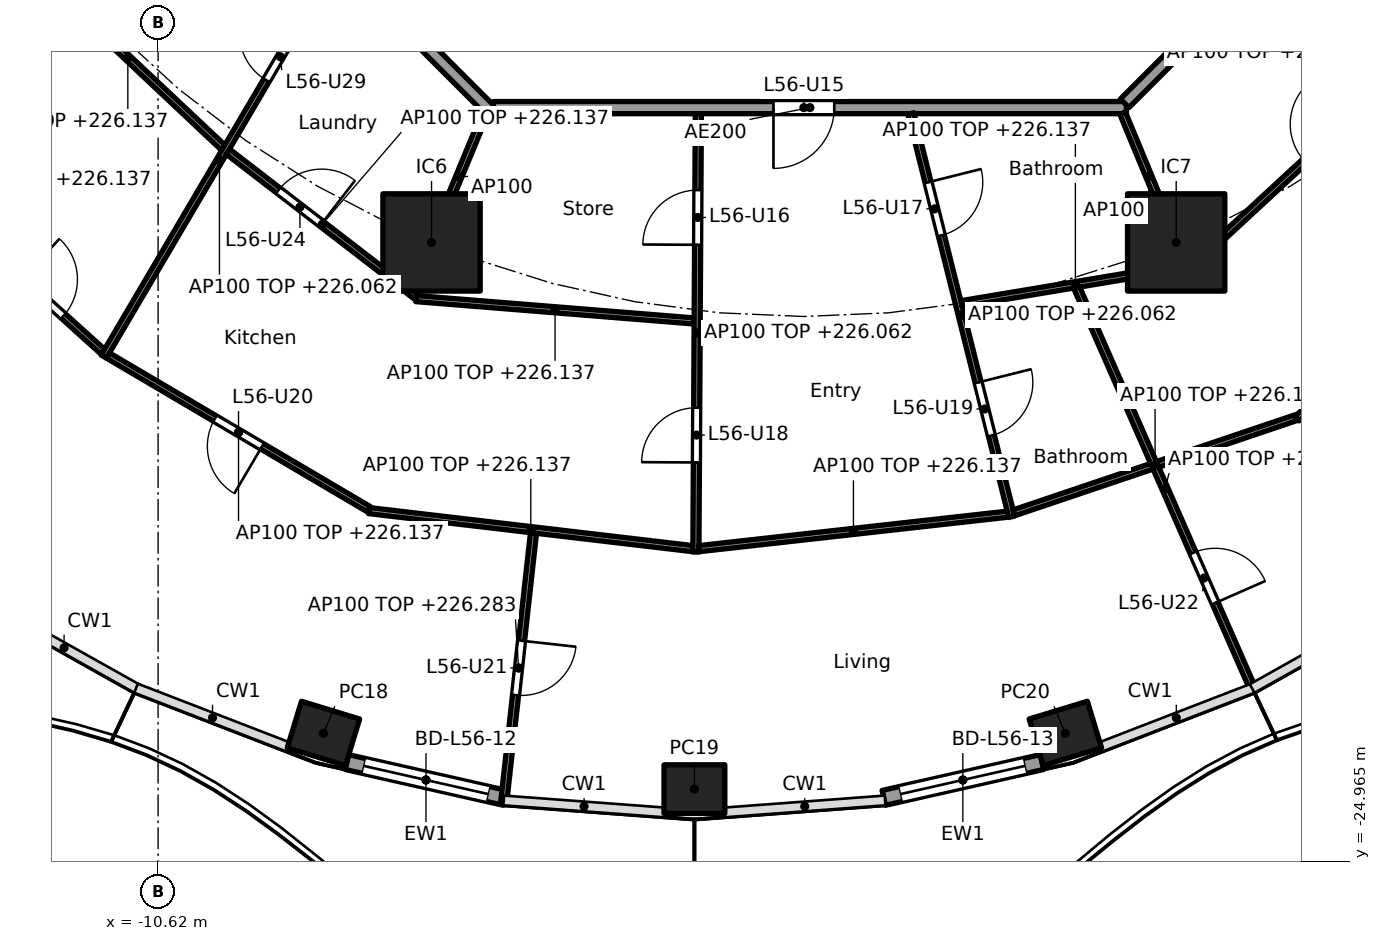
"""IFC4 building model, lengths in metres.
Left out: names, types, materials, properties, quantities, classifications, styles, units other than length and angle.
Written with IfcOpenShell. Run it as: python <this file> out.ifc"""

import sys

from ifc_helpers import new_model, si_unit, direction, frame, frame_2d, origin, origin_2d, place, context, subcontext, project, spatial, rectangle, hollow_rectangle, extrude, element, fill, save


model = new_model("IFC4")
c1 = context("Model", 3, precision=1e-05, world=origin(), true_north=direction((0.0, 1.0)))
c2 = subcontext(c1, "Body", "Model", "MODEL_VIEW")
j1 = project(units=[si_unit("LENGTHUNIT", "METRE"), si_unit("PLANEANGLEUNIT", "RADIAN")], contexts=[c1])
p1 = place(None, origin())
s1 = spatial("IfcSite", under=j1, at=p1, CompositionType="ELEMENT")
p2 = place(p1, origin())
s2 = spatial("IfcBuilding", under=s1, at=p2, CompositionType="ELEMENT")
p3 = place(p2, frame((0.0, 0.0, 223.3)))
s3 = spatial("IfcBuildingStorey", under=s2, at=p3, CompositionType="ELEMENT", Elevation=223.3)
for number, where, z_axis, x_axis in (
    (1, (-7.9, -22.856, 0.0), (0.0, 0.0, 1.0), (0.957, -0.292, 0.0)),
    (2, (-1.8, -23.772, 0.0), (0.0, 0.0, 1.0), (1.0, 0.0, 0.0)),
    (3, (4.3, -22.856, 0.0), (0.0, 0.0, 1.0), (0.957, 0.292, 0.0)),
):
    element("IfcColumn", number, at=place(p3, frame(where, z_axis=z_axis, x_axis=x_axis)), inside=s3, PredefinedType="COLUMN", context=c2, shape_type="SweptSolid", body=[
        extrude(hollow_rectangle(XDim=1.0, YDim=0.8, WallThickness=0.032, at=origin_2d()), origin(), (0.0, 0.0, 1.0), 3.7),
    ])
for number, where, z_axis, x_axis in (
    (4, (-6.123, -14.782, 0.0), (0.0, 0.0, 1.0), (1.0, 0.0, 0.0)),
    (5, (6.123, -14.782, 0.0), (0.0, 0.0, 1.0), (1.0, 0.0, 0.0)),
):
    element("IfcColumn", number, at=place(p3, frame(where, z_axis=z_axis, x_axis=x_axis)), inside=s3, PredefinedType="COLUMN", context=c2, shape_type="SweptSolid", body=[
        extrude(rectangle(XDim=1.6, YDim=1.6, at=origin_2d()), origin(), (0.0, 0.0, 1.0), 3.7),
    ])
p4 = place(p3, frame((-4.914, -23.916, 0.0), z_axis=(0.0, 0.0, 1.0), x_axis=(-0.975324089124, 0.220777990694, 0.0)))
e6 = element("IfcWall", 6, at=p4, inside=s3, PredefinedType="SOLIDWALL", context=c2, shape_type="SweptSolid", body=[
    extrude(rectangle(XDim=2.666, YDim=0.25, at=frame_2d((1.333, 0.0))), origin(), (0.0, 0.0, 1.0), 3.44),
])
p5 = place(p4, frame((0.283, 0.0, 0.0)))
e7 = element("IfcOpeningElement", 7, at=p5, cuts=e6, PredefinedType="OPENING", context=c2, shape_type="SweptSolid", body=[
    extrude(rectangle(XDim=2.1, YDim=2.4, at=frame_2d((1.05, 1.2))), frame((0.0, 0.135, 0.0), z_axis=(0.0, -1.0, 0.0), x_axis=(1.0, 0.0, 0.0)), (0.0, 0.0, 1.0), 0.27),
])
p6 = place(p3, frame((3.915, -23.327, 0.0), z_axis=(0.0, 0.0, 1.0), x_axis=(-0.975324089124, -0.220777990694, 0.0)))
e8 = element("IfcWall", 8, at=p6, inside=s3, PredefinedType="SOLIDWALL", context=c2, shape_type="SweptSolid", body=[
    extrude(rectangle(XDim=2.666, YDim=0.25, at=frame_2d((1.333, 0.0))), origin(), (0.0, 0.0, 1.0), 3.44),
])
p7 = place(p6, frame((0.283, 0.0, 0.0)))
e9 = element("IfcOpeningElement", 9, at=p7, cuts=e8, PredefinedType="OPENING", context=c2, shape_type="SweptSolid", body=[
    extrude(rectangle(XDim=2.1, YDim=2.4, at=frame_2d((1.05, 1.2))), frame((0.0, 0.135, 0.0), z_axis=(0.0, -1.0, 0.0), x_axis=(1.0, 0.0, 0.0)), (0.0, 0.0, 1.0), 0.27),
])
p8 = place(p3, frame((-12.635, -5.134, 0.0), z_axis=(0.0, 0.0, 1.0), x_axis=(0.707106781187, -0.707106781187, 0.0)))
e10 = element("IfcWall", 10, at=p8, inside=s3, PredefinedType="PARTITIONING", context=c2, shape_type="SweptSolid", body=[
    extrude(rectangle(XDim=10.609, YDim=0.2, at=frame_2d((5.305, 0.0))), origin(), (0.0, 0.0, 1.0), 3.44),
])
p9 = place(p3, frame((-5.104, -12.565, 0.0), z_axis=(0.0, 0.0, 1.0), x_axis=(1.0, 0.0, 0.0)))
e11 = element("IfcWall", 11, at=p9, inside=s3, PredefinedType="PARTITIONING", context=c2, shape_type="SweptSolid", body=[
    extrude(rectangle(XDim=10.409, YDim=0.2, at=frame_2d((5.205, 0.0))), origin(), (0.0, 0.0, 1.0), 3.44),
])
p10 = place(p9, frame((4.604, 0.0, 0.0)))
e12 = element("IfcOpeningElement", 12, at=p10, cuts=e11, PredefinedType="OPENING", context=c2, shape_type="SweptSolid", body=[
    extrude(rectangle(XDim=1.0, YDim=2.1, at=frame_2d((0.5, 1.05))), frame((0.0, 0.11, 0.0), z_axis=(0.0, -1.0, 0.0), x_axis=(1.0, 0.0, 0.0)), (0.0, 0.0, 1.0), 0.22),
])
p11 = place(p3, frame((5.275, -12.494, 0.0), z_axis=(0.0, 0.0, 1.0), x_axis=(0.707106781187, 0.707106781187, 0.0)))
e13 = element("IfcWall", 13, at=p11, inside=s3, PredefinedType="PARTITIONING", context=c2, shape_type="SweptSolid", body=[
    extrude(rectangle(XDim=10.409, YDim=0.2, at=frame_2d((5.205, 0.0))), origin(), (0.0, 0.0, 1.0), 3.44),
])
p12 = place(p3, frame((-12.688, -10.27, 0.0), z_axis=(0.0, 0.0, 1.0), x_axis=(0.728268142903, -0.685292282192, 0.0)))
e14 = element("IfcWall", 14, at=p12, inside=s3, PredefinedType="PARTITIONING", context=c2, shape_type="SweptSolid", body=[
    extrude(rectangle(XDim=4.312, YDim=0.1, at=frame_2d((2.156, 0.0))), origin(), (0.0, 0.0, 1.0), 2.837),
])
p13 = place(p3, frame((-15.474, -13.019, 0.0), z_axis=(0.0, 0.0, 1.0), x_axis=(0.742348572616, -0.670013878017, 0.0)))
e15 = element("IfcWall", 15, at=p13, inside=s3, PredefinedType="PARTITIONING", context=c2, shape_type="SweptSolid", body=[
    extrude(rectangle(XDim=5.319, YDim=0.1, at=frame_2d((2.66, 0.0))), origin(), (0.0, 0.0, 1.0), 2.837),
])
p14 = place(p13, frame((3.54, 0.0, 0.0)))
e16 = element("IfcOpeningElement", 16, at=p14, cuts=e15, PredefinedType="OPENING", context=c2, shape_type="SweptSolid", body=[
    extrude(rectangle(XDim=0.9, YDim=2.1, at=frame_2d((0.45, 1.05))), frame((0.0, 0.06, 0.0), z_axis=(0.0, -1.0, 0.0), x_axis=(1.0, 0.0, 0.0)), (0.0, 0.0, 1.0), 0.12),
])
p15 = place(p3, frame((-7.709, -10.198, 0.0), z_axis=(0.0, 0.0, 1.0), x_axis=(-0.507362999545, -0.861732433353, 0.0)))
e17 = element("IfcWall", 17, at=p15, inside=s3, PredefinedType="PARTITIONING", context=c2, shape_type="SweptSolid", body=[
    extrude(rectangle(XDim=7.499, YDim=0.1, at=frame_2d((3.749, 0.0))), origin(), (0.0, 0.0, 1.0), 2.762),
])
p16 = place(p15, frame((1.326, 0.0, 0.0)))
e18 = element("IfcOpeningElement", 18, at=p16, cuts=e17, PredefinedType="OPENING", context=c2, shape_type="SweptSolid", body=[
    extrude(rectangle(XDim=0.9, YDim=2.1, at=frame_2d((0.45, 1.05))), frame((0.0, 0.06, 0.0), z_axis=(0.0, -1.0, 0.0), x_axis=(1.0, 0.0, 0.0)), (0.0, 0.0, 1.0), 0.12),
])
p17 = place(p3, frame((-9.471, -13.289, 0.0), z_axis=(0.0, 0.0, 1.0), x_axis=(0.7922205419, -0.61023488346, 0.0)))
e19 = element("IfcWall", 19, at=p17, inside=s3, PredefinedType="PARTITIONING", context=c2, shape_type="SweptSolid", body=[
    extrude(rectangle(XDim=3.916, YDim=0.1, at=frame_2d((1.958, 0.0))), origin(), (0.0, 0.0, 1.0), 2.837),
])
p18 = place(p17, frame((1.045, 0.0, 0.0)))
e20 = element("IfcOpeningElement", 20, at=p18, cuts=e19, PredefinedType="OPENING", context=c2, shape_type="SweptSolid", body=[
    extrude(rectangle(XDim=0.9, YDim=2.1, at=frame_2d((0.45, 1.05))), frame((0.0, 0.06, 0.0), z_axis=(0.0, -1.0, 0.0), x_axis=(1.0, 0.0, 0.0)), (0.0, 0.0, 1.0), 0.12),
])
p19 = place(p3, frame((-11.445, -16.641, 0.0), z_axis=(0.0, 0.0, 1.0), x_axis=(0.861562560957, -0.507651409489, 0.0)))
e21 = element("IfcWall", 21, at=p19, inside=s3, PredefinedType="PARTITIONING", context=c2, shape_type="SweptSolid", body=[
    extrude(rectangle(XDim=4.985, YDim=0.1, at=frame_2d((2.492, 0.0))), origin(), (0.0, 0.0, 1.0), 2.837),
])
p20 = place(p19, frame((2.042, 0.0, 0.0)))
e22 = element("IfcOpeningElement", 22, at=p20, cuts=e21, PredefinedType="OPENING", context=c2, shape_type="SweptSolid", body=[
    extrude(rectangle(XDim=0.9, YDim=2.1, at=frame_2d((0.45, 1.05))), frame((0.0, 0.06, 0.0), z_axis=(0.0, -1.0, 0.0), x_axis=(1.0, 0.0, 0.0)), (0.0, 0.0, 1.0), 0.12),
])
p21 = place(p3, frame((-5.243, -12.657, 0.0), z_axis=(0.0, 0.0, 1.0), x_axis=(-0.382719158442, -0.923864733477, 0.0)))
e23 = element("IfcWall", 23, at=p21, inside=s3, PredefinedType="PARTITIONING", context=c2, shape_type="SweptSolid", body=[
    extrude(rectangle(XDim=2.25, YDim=0.1, at=frame_2d((1.125, 0.0))), origin(), (0.0, 0.0, 1.0), 3.44),
])
p22 = place(p3, frame((-6.379, -15.705, 0.0), z_axis=(0.0, 0.0, 1.0), x_axis=(0.996786462227, -0.080104611105, 0.0)))
e24 = element("IfcWall", 24, at=p22, inside=s3, PredefinedType="PARTITIONING", context=c2, shape_type="SweptSolid", body=[
    extrude(rectangle(XDim=4.59, YDim=0.1, at=frame_2d((2.295, 0.0))), origin(), (0.0, 0.0, 1.0), 2.837),
])
p23 = place(p3, frame((-7.156, -19.191, 0.0), z_axis=(0.0, 0.0, 1.0), x_axis=(0.993172627718, -0.116653896424, 0.0)))
e25 = element("IfcWall", 25, at=p23, inside=s3, PredefinedType="PARTITIONING", context=c2, shape_type="SweptSolid", body=[
    extrude(rectangle(XDim=5.368, YDim=0.1, at=frame_2d((2.684, 0.0))), origin(), (0.0, 0.0, 1.0), 2.837),
])
p24 = place(p3, frame((-4.447, -19.56, 0.0), z_axis=(0.0, 0.0, 1.0), x_axis=(-0.109897425445, -0.993942933915, 0.0)))
e26 = element("IfcWall", 26, at=p24, inside=s3, PredefinedType="PARTITIONING", context=c2, shape_type="SweptSolid", body=[
    extrude(rectangle(XDim=4.465, YDim=0.1, at=frame_2d((2.233, 0.0))), origin(), (0.0, 0.0, 1.0), 2.983),
])
p25 = place(p24, frame((1.783, 0.0, 0.0)))
e27 = element("IfcOpeningElement", 27, at=p25, cuts=e26, PredefinedType="OPENING", context=c2, shape_type="SweptSolid", body=[
    extrude(rectangle(XDim=0.9, YDim=2.1, at=frame_2d((0.45, 1.05))), frame((0.0, 0.06, 0.0), z_axis=(0.0, -1.0, 0.0), x_axis=(1.0, 0.0, 0.0)), (0.0, 0.0, 1.0), 0.12),
])
p26 = place(p3, frame((-1.735, -12.665, 0.0), z_axis=(0.0, 0.0, 1.0), x_axis=(-0.005554152823, -0.999984575574, 0.0)))
e28 = element("IfcWall", 28, at=p26, inside=s3, PredefinedType="PARTITIONING", context=c2, shape_type="SweptSolid", body=[
    extrude(rectangle(XDim=7.209, YDim=0.1, at=frame_2d((3.604, 0.0))), origin(), (0.0, 0.0, 1.0), 2.762),
])
p27 = place(p26, frame((1.256, 0.0, 0.0)))
e29 = element("IfcOpeningElement", 29, at=p27, cuts=e28, PredefinedType="OPENING", context=c2, shape_type="SweptSolid", body=[
    extrude(rectangle(XDim=0.9, YDim=2.1, at=frame_2d((0.45, 1.05))), frame((0.0, 0.06, 0.0), z_axis=(0.0, -1.0, 0.0), x_axis=(1.0, 0.0, 0.0)), (0.0, 0.0, 1.0), 0.12),
])
p28 = place(p26, frame((4.836, 0.0, 0.0)))
e30 = element("IfcOpeningElement", 30, at=p28, cuts=e28, PredefinedType="OPENING", context=c2, shape_type="SweptSolid", body=[
    extrude(rectangle(XDim=0.9, YDim=2.1, at=frame_2d((0.45, 1.05))), frame((0.0, 0.06, 0.0), z_axis=(0.0, -1.0, 0.0), x_axis=(1.0, 0.0, 0.0)), (0.0, 0.0, 1.0), 0.12),
])
p29 = place(p3, frame((-1.726, -19.818, 0.0), z_axis=(0.0, 0.0, 1.0), x_axis=(0.99381893047, 0.111013212902, 0.0)))
e31 = element("IfcWall", 31, at=p29, inside=s3, PredefinedType="PARTITIONING", context=c2, shape_type="SweptSolid", body=[
    extrude(rectangle(XDim=5.113, YDim=0.1, at=frame_2d((2.557, 0.0))), origin(), (0.0, 0.0, 1.0), 2.837),
])
p30 = place(p3, frame((1.759, -12.662, 0.0), z_axis=(0.0, 0.0, 1.0), x_axis=(0.242653275363, -0.970113079984, 0.0)))
e32 = element("IfcWall", 32, at=p30, inside=s3, PredefinedType="PARTITIONING", context=c2, shape_type="SweptSolid", body=[
    extrude(rectangle(XDim=6.836, YDim=0.1, at=frame_2d((3.418, 0.0))), origin(), (0.0, 0.0, 1.0), 2.762),
])
p31 = place(p30, frame((1.166, 0.0, 0.0)))
e33 = element("IfcOpeningElement", 33, at=p31, cuts=e32, PredefinedType="OPENING", context=c2, shape_type="SweptSolid", body=[
    extrude(rectangle(XDim=0.9, YDim=2.1, at=frame_2d((0.45, 1.05))), frame((0.0, 0.06, 0.0), z_axis=(0.0, -1.0, 0.0), x_axis=(1.0, 0.0, 0.0)), (0.0, 0.0, 1.0), 0.12),
])
p32 = place(p30, frame((4.559, 0.0, 0.0)))
e34 = element("IfcOpeningElement", 34, at=p32, cuts=e32, PredefinedType="OPENING", context=c2, shape_type="SweptSolid", body=[
    extrude(rectangle(XDim=0.9, YDim=2.1, at=frame_2d((0.45, 1.05))), frame((0.0, 0.06, 0.0), z_axis=(0.0, -1.0, 0.0), x_axis=(1.0, 0.0, 0.0)), (0.0, 0.0, 1.0), 0.12),
])
p33 = place(p3, frame((2.593, -15.789, 0.0), z_axis=(0.0, 0.0, 1.0), x_axis=(0.986381756816, 0.164471972749, 0.0)))
e35 = element("IfcWall", 35, at=p33, inside=s3, PredefinedType="PARTITIONING", context=c2, shape_type="SweptSolid", body=[
    extrude(rectangle(XDim=3.797, YDim=0.1, at=frame_2d((1.898, 0.0))), origin(), (0.0, 0.0, 1.0), 2.837),
])
p34 = place(p3, frame((3.453, -19.229, 0.0), z_axis=(0.0, 0.0, 1.0), x_axis=(0.947572025416, 0.319542261133, 0.0)))
e36 = element("IfcWall", 36, at=p34, inside=s3, PredefinedType="PARTITIONING", context=c2, shape_type="SweptSolid", body=[
    extrude(rectangle(XDim=4.903, YDim=0.1, at=frame_2d((2.451, 0.0))), origin(), (0.0, 0.0, 1.0), 2.837),
])
p35 = place(p3, frame((4.485, -15.522, 0.0), z_axis=(0.0, 0.0, 1.0), x_axis=(0.401959715825, -0.915657352318, 0.0)))
e37 = element("IfcWall", 37, at=p35, inside=s3, PredefinedType="PARTITIONING", context=c2, shape_type="SweptSolid", body=[
    extrude(rectangle(XDim=7.239, YDim=0.1, at=frame_2d((3.619, 0.0))), origin(), (0.0, 0.0, 1.0), 2.983),
])
p36 = place(p35, frame((4.767, 0.0, 0.0)))
e38 = element("IfcOpeningElement", 38, at=p36, cuts=e37, PredefinedType="OPENING", context=c2, shape_type="SweptSolid", body=[
    extrude(rectangle(XDim=0.9, YDim=2.1, at=frame_2d((0.45, 1.05))), frame((0.0, 0.06, 0.0), z_axis=(0.0, -1.0, 0.0), x_axis=(1.0, 0.0, 0.0)), (0.0, 0.0, 1.0), 0.12),
])
p37 = place(p3, frame((5.243, -12.657, 0.0), z_axis=(0.0, 0.0, 1.0), x_axis=(0.382719158442, -0.923864733477, 0.0)))
e39 = element("IfcWall", 39, at=p37, inside=s3, PredefinedType="PARTITIONING", context=c2, shape_type="SweptSolid", body=[
    extrude(rectangle(XDim=2.25, YDim=0.1, at=frame_2d((1.125, 0.0))), origin(), (0.0, 0.0, 1.0), 3.44),
])
p38 = place(p3, frame((6.351, -15.19, 0.0), z_axis=(0.0, 0.0, 1.0), x_axis=(0.73462674599, 0.678471476243, 0.0)))
e40 = element("IfcWall", 40, at=p38, inside=s3, PredefinedType="PARTITIONING", context=c2, shape_type="SweptSolid", body=[
    extrude(rectangle(XDim=5.987, YDim=0.1, at=frame_2d((2.993, 0.0))), origin(), (0.0, 0.0, 1.0), 2.837),
])
p39 = place(p38, frame((2.568, 0.0, 0.0)))
e41 = element("IfcOpeningElement", 41, at=p39, cuts=e40, PredefinedType="OPENING", context=c2, shape_type="SweptSolid", body=[
    extrude(rectangle(XDim=0.9, YDim=2.1, at=frame_2d((0.45, 1.05))), frame((0.0, 0.06, 0.0), z_axis=(0.0, -1.0, 0.0), x_axis=(1.0, 0.0, 0.0)), (0.0, 0.0, 1.0), 0.12),
])
p40 = place(p3, frame((8.109, -17.679, 0.0), z_axis=(0.0, 0.0, 1.0), x_axis=(0.743675165651, 0.668541134108, 0.0)))
e42 = element("IfcWall", 42, at=p40, inside=s3, PredefinedType="PARTITIONING", context=c2, shape_type="SweptSolid", body=[
    extrude(rectangle(XDim=6.275, YDim=0.1, at=frame_2d((3.137, 0.0))), origin(), (0.0, 0.0, 1.0), 2.837),
])
p41 = place(p40, frame((2.712, 0.0, 0.0)))
e43 = element("IfcOpeningElement", 43, at=p41, cuts=e42, PredefinedType="OPENING", context=c2, shape_type="SweptSolid", body=[
    extrude(rectangle(XDim=0.9, YDim=2.1, at=frame_2d((0.45, 1.05))), frame((0.0, 0.06, 0.0), z_axis=(0.0, -1.0, 0.0), x_axis=(1.0, 0.0, 0.0)), (0.0, 0.0, 1.0), 0.12),
])
p42 = place(p5, origin())
e44 = element("IfcDoor", 44, at=p42, inside=s3, OperationType="SLIDING_TO_LEFT", PredefinedType="DOOR", context=c2, shape_type="SweptSolid", body=[
    extrude(rectangle(XDim=2.1, YDim=2.4, at=frame_2d((1.05, 1.2))), frame((0.0, 0.025, 0.0), z_axis=(0.0, -1.0, 0.0), x_axis=(1.0, 0.0, 0.0)), (0.0, 0.0, 1.0), 0.05),
])
fill(e7, e44)
p43 = place(p7, origin())
e45 = element("IfcDoor", 45, at=p43, inside=s3, OperationType="SLIDING_TO_LEFT", PredefinedType="DOOR", context=c2, shape_type="SweptSolid", body=[
    extrude(rectangle(XDim=2.1, YDim=2.4, at=frame_2d((1.05, 1.2))), frame((0.0, 0.025, 0.0), z_axis=(0.0, -1.0, 0.0), x_axis=(1.0, 0.0, 0.0)), (0.0, 0.0, 1.0), 0.05),
])
fill(e9, e45)
p44 = place(p10, frame((1.0, 0.0, 0.0), x_axis=(-1.0, 0.0, 0.0)))
e46 = element("IfcDoor", 46, at=p44, inside=s3, OperationType="SINGLE_SWING_RIGHT", PredefinedType="DOOR", context=c2, shape_type="SweptSolid", body=[
    extrude(rectangle(XDim=1.0, YDim=2.1, at=frame_2d((0.5, 1.05))), frame((0.0, 0.025, 0.0), z_axis=(0.0, -1.0, 0.0), x_axis=(1.0, 0.0, 0.0)), (0.0, 0.0, 1.0), 0.05),
])
fill(e12, e46)
p45 = place(p27, frame((0.9, 0.0, 0.0), x_axis=(-1.0, 0.0, 0.0)))
e47 = element("IfcDoor", 47, at=p45, inside=s3, OperationType="SINGLE_SWING_LEFT", PredefinedType="DOOR", context=c2, shape_type="SweptSolid", body=[
    extrude(rectangle(XDim=0.9, YDim=2.1, at=frame_2d((0.45, 1.05))), frame((0.0, 0.025, 0.0), z_axis=(0.0, -1.0, 0.0), x_axis=(1.0, 0.0, 0.0)), (0.0, 0.0, 1.0), 0.05),
])
fill(e29, e47)
p46 = place(p31, origin())
e48 = element("IfcDoor", 48, at=p46, inside=s3, OperationType="SINGLE_SWING_LEFT", PredefinedType="DOOR", context=c2, shape_type="SweptSolid", body=[
    extrude(rectangle(XDim=0.9, YDim=2.1, at=frame_2d((0.45, 1.05))), frame((0.0, 0.025, 0.0), z_axis=(0.0, -1.0, 0.0), x_axis=(1.0, 0.0, 0.0)), (0.0, 0.0, 1.0), 0.05),
])
fill(e33, e48)
p47 = place(p28, frame((0.9, 0.0, 0.0), x_axis=(-1.0, 0.0, 0.0)))
e49 = element("IfcDoor", 49, at=p47, inside=s3, OperationType="SINGLE_SWING_LEFT", PredefinedType="DOOR", context=c2, shape_type="SweptSolid", body=[
    extrude(rectangle(XDim=0.9, YDim=2.1, at=frame_2d((0.45, 1.05))), frame((0.0, 0.025, 0.0), z_axis=(0.0, -1.0, 0.0), x_axis=(1.0, 0.0, 0.0)), (0.0, 0.0, 1.0), 0.05),
])
fill(e30, e49)
p48 = place(p32, origin())
e50 = element("IfcDoor", 50, at=p48, inside=s3, OperationType="SINGLE_SWING_LEFT", PredefinedType="DOOR", context=c2, shape_type="SweptSolid", body=[
    extrude(rectangle(XDim=0.9, YDim=2.1, at=frame_2d((0.45, 1.05))), frame((0.0, 0.025, 0.0), z_axis=(0.0, -1.0, 0.0), x_axis=(1.0, 0.0, 0.0)), (0.0, 0.0, 1.0), 0.05),
])
fill(e34, e50)
p49 = place(p20, frame((0.9, 0.0, 0.0), x_axis=(-1.0, 0.0, 0.0)))
e51 = element("IfcDoor", 51, at=p49, inside=s3, OperationType="SINGLE_SWING_LEFT", PredefinedType="DOOR", context=c2, shape_type="SweptSolid", body=[
    extrude(rectangle(XDim=0.9, YDim=2.1, at=frame_2d((0.45, 1.05))), frame((0.0, 0.025, 0.0), z_axis=(0.0, -1.0, 0.0), x_axis=(1.0, 0.0, 0.0)), (0.0, 0.0, 1.0), 0.05),
])
fill(e22, e51)
p50 = place(p25, origin())
e52 = element("IfcDoor", 52, at=p50, inside=s3, OperationType="SINGLE_SWING_LEFT", PredefinedType="DOOR", context=c2, shape_type="SweptSolid", body=[
    extrude(rectangle(XDim=0.9, YDim=2.1, at=frame_2d((0.45, 1.05))), frame((0.0, 0.025, 0.0), z_axis=(0.0, -1.0, 0.0), x_axis=(1.0, 0.0, 0.0)), (0.0, 0.0, 1.0), 0.05),
])
fill(e27, e52)
p51 = place(p36, origin())
e53 = element("IfcDoor", 53, at=p51, inside=s3, OperationType="SINGLE_SWING_RIGHT", PredefinedType="DOOR", context=c2, shape_type="SweptSolid", body=[
    extrude(rectangle(XDim=0.9, YDim=2.1, at=frame_2d((0.45, 1.05))), frame((0.0, 0.025, 0.0), z_axis=(0.0, -1.0, 0.0), x_axis=(1.0, 0.0, 0.0)), (0.0, 0.0, 1.0), 0.05),
])
fill(e38, e53)
p52 = place(p18, origin())
e54 = element("IfcDoor", 54, at=p52, inside=s3, OperationType="SINGLE_SWING_RIGHT", PredefinedType="DOOR", context=c2, shape_type="SweptSolid", body=[
    extrude(rectangle(XDim=0.9, YDim=2.1, at=frame_2d((0.45, 1.05))), frame((0.0, 0.025, 0.0), z_axis=(0.0, -1.0, 0.0), x_axis=(1.0, 0.0, 0.0)), (0.0, 0.0, 1.0), 0.05),
])
fill(e20, e54)
p53 = place(p14, origin())
e55 = element("IfcDoor", 55, at=p53, inside=s3, OperationType="SINGLE_SWING_LEFT", PredefinedType="DOOR", context=c2, shape_type="SweptSolid", body=[
    extrude(rectangle(XDim=0.9, YDim=2.1, at=frame_2d((0.45, 1.05))), frame((0.0, 0.025, 0.0), z_axis=(0.0, -1.0, 0.0), x_axis=(1.0, 0.0, 0.0)), (0.0, 0.0, 1.0), 0.05),
])
fill(e16, e55)
p54 = place(p16, frame((0.9, 0.0, 0.0), x_axis=(-1.0, 0.0, 0.0)))
e56 = element("IfcDoor", 56, at=p54, inside=s3, OperationType="SINGLE_SWING_RIGHT", PredefinedType="DOOR", context=c2, shape_type="SweptSolid", body=[
    extrude(rectangle(XDim=0.9, YDim=2.1, at=frame_2d((0.45, 1.05))), frame((0.0, 0.025, 0.0), z_axis=(0.0, -1.0, 0.0), x_axis=(1.0, 0.0, 0.0)), (0.0, 0.0, 1.0), 0.05),
])
fill(e18, e56)
save(model, sys.argv[1])
